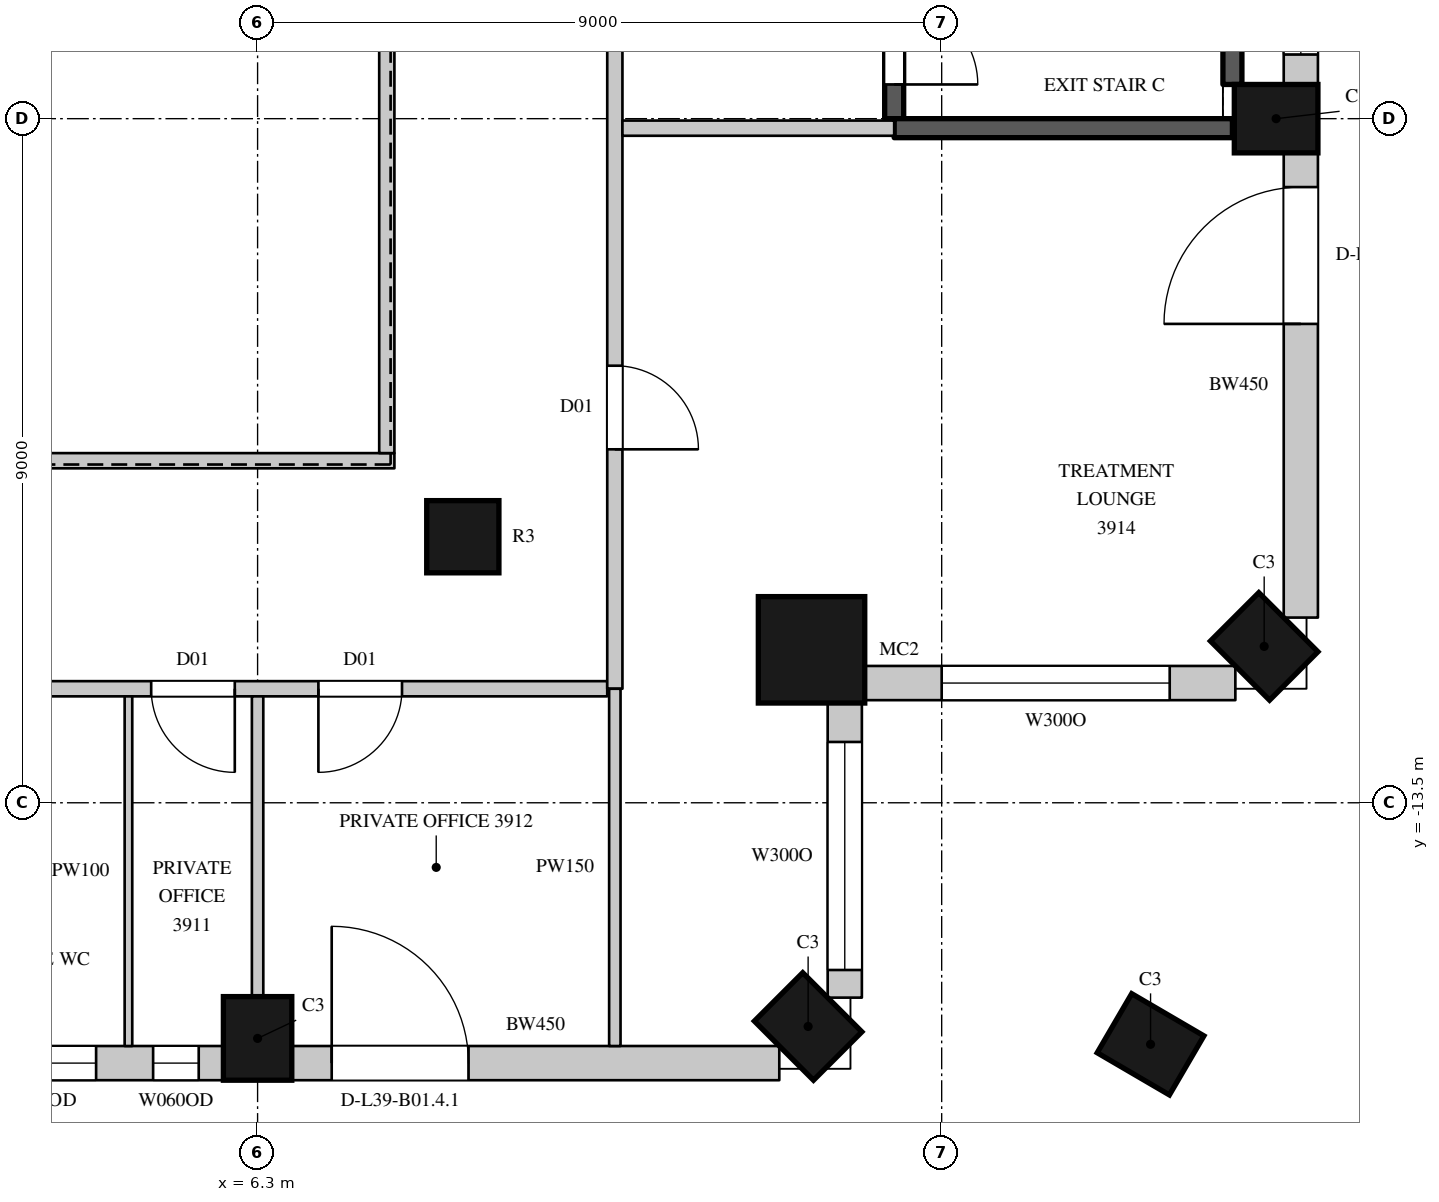
"""IFC4 building model, lengths in metres.
Left out: names, types, materials, properties, quantities, classifications, styles, units other than length and angle.
Written with IfcOpenShell. Run it as: python <this file> out.ifc"""

import sys

from ifc_helpers import new_model, si_unit, direction, frame, frame_2d, origin, origin_2d, place, context, subcontext, project, spatial, rectangle, circle, extrude, element, fill, save


model = new_model("IFC4")
c1 = context("Model", 3, precision=1e-05, world=origin(), true_north=direction((0.0, 1.0)))
c2 = subcontext(c1, "Body", "Model", "MODEL_VIEW")
j1 = project(units=[si_unit("LENGTHUNIT", "METRE"), si_unit("PLANEANGLEUNIT", "RADIAN")], contexts=[c1])
p1 = place(None, origin())
s1 = spatial("IfcSite", under=j1, at=p1, CompositionType="ELEMENT")
p2 = place(p1, origin())
s2 = spatial("IfcBuilding", under=s1, at=p2, CompositionType="ELEMENT")
p3 = place(p2, frame((0.0, 0.0, 181.0)))
s3 = spatial("IfcBuildingStorey", under=s2, at=p3, CompositionType="ELEMENT", Elevation=181.0)
for number, where, z_axis, x_axis in (
    (1, (6.3, -16.6, 0.0), (0.0, 0.0, 1.0), (1.0, 0.0, 0.0)),
    (2, (13.543, -16.443, 0.0), (0.0, 0.0, 1.0), (0.707, 0.707, 0.0)),
):
    element("IfcColumn", number, at=place(p3, frame(where, z_axis=z_axis, x_axis=x_axis)), inside=s3, PredefinedType="COLUMN", context=c2, shape_type="SweptSolid", body=[
        extrude(rectangle(XDim=0.9, YDim=1.1, at=origin_2d()), origin(), (0.0, 0.0, 1.0), 4.1),
    ])
p4 = place(p3, frame((13.588, -11.488, 0.0), z_axis=(0.0, 0.0, 1.0), x_axis=(1.0, 0.0, 0.0)))
e3 = element("IfcColumn", 3, at=p4, inside=s3, PredefinedType="COLUMN", context=c2, shape_type="SweptSolid", body=[
    extrude(circle(Radius=0.7, at=origin_2d()), origin(), (0.0, 0.0, 1.0), 4.1),
])
for number, where, z_axis, x_axis in (
    (4, (19.543, -11.443, 0.0), (0.0, 0.0, 1.0), (0.707, 0.707, 0.0)),
    (5, (19.7, -4.5, 0.0), (0.0, 0.0, 1.0), (0.0, 1.0, 0.0)),
    (6, (18.048, -16.677, 0.0), (0.0, 0.0, 1.0), (0.504, 0.863, 0.0)),
):
    element("IfcColumn", number, at=place(p3, frame(where, z_axis=z_axis, x_axis=x_axis)), inside=s3, PredefinedType="COLUMN", context=c2, shape_type="SweptSolid", body=[
        extrude(rectangle(XDim=0.9, YDim=1.1, at=origin_2d()), origin(), (0.0, 0.0, 1.0), 4.1),
    ])
p5 = place(p3, frame((9.0, -10.0, 0.0), z_axis=(0.0, 0.0, 1.0), x_axis=(1.0, 0.0, 0.0)))
e7 = element("IfcColumn", 7, at=p5, inside=s3, PredefinedType="COLUMN", context=c2, shape_type="SweptSolid", body=[
    extrude(circle(Radius=0.475, at=origin_2d()), origin(), (0.0, 0.0, 1.0), 4.1),
])
p6 = place(p3, frame((-2.25, -16.925, 0.0), z_axis=(0.0, 0.0, 1.0), x_axis=(1.0, 0.0, 0.0)))
e8 = element("IfcWall", 8, at=p6, inside=s3, PredefinedType="SOLIDWALL", context=c2, shape_type="SweptSolid", body=[
    extrude(rectangle(XDim=8.1, YDim=0.45, at=frame_2d((4.05, 0.0))), origin(), (0.0, 0.0, 1.0), 3.8),
])
p7 = place(p6, frame((0.2, 0.0, 0.0)))
e9 = element("IfcOpeningElement", 9, at=p7, cuts=e8, PredefinedType="OPENING", context=c2, shape_type="SweptSolid", body=[
    extrude(rectangle(XDim=1.8, YDim=2.4, at=frame_2d((0.9, 1.2))), frame((0.0, 0.235, 0.0), z_axis=(0.0, -1.0, 0.0), x_axis=(1.0, 0.0, 0.0)), (0.0, 0.0, 1.0), 0.47),
])
p8 = place(p6, frame((2.2, 0.0, 1.05)))
e10 = element("IfcOpeningElement", 10, at=p8, cuts=e8, PredefinedType="OPENING", context=c2, shape_type="SweptSolid", body=[
    extrude(rectangle(XDim=1.2, YDim=2.4, at=frame_2d((0.6, 1.2))), frame((0.0, 0.235, 0.0), z_axis=(0.0, -1.0, 0.0), x_axis=(1.0, 0.0, 0.0)), (0.0, 0.0, 1.0), 0.47),
])
p9 = place(p6, frame((4.926, 0.0, 1.05)))
e11 = element("IfcOpeningElement", 11, at=p9, cuts=e8, PredefinedType="OPENING", context=c2, shape_type="SweptSolid", body=[
    extrude(rectangle(XDim=1.5, YDim=2.4, at=frame_2d((0.75, 1.2))), frame((0.0, 0.235, 0.0), z_axis=(0.0, -1.0, 0.0), x_axis=(1.0, 0.0, 0.0)), (0.0, 0.0, 1.0), 0.47),
])
p10 = place(p6, frame((7.176, 0.0, 1.05)))
e12 = element("IfcOpeningElement", 12, at=p10, cuts=e8, PredefinedType="OPENING", context=c2, shape_type="SweptSolid", body=[
    extrude(rectangle(XDim=0.6, YDim=2.4, at=frame_2d((0.3, 1.2))), frame((0.0, 0.235, 0.0), z_axis=(0.0, -1.0, 0.0), x_axis=(1.0, 0.0, 0.0)), (0.0, 0.0, 1.0), 0.47),
])
p11 = place(p3, frame((6.75, -16.925, 0.0), z_axis=(0.0, 0.0, 1.0), x_axis=(1.0, 0.0, 0.0)))
e13 = element("IfcWall", 13, at=p11, inside=s3, PredefinedType="SOLIDWALL", context=c2, shape_type="SweptSolid", body=[
    extrude(rectangle(XDim=6.414, YDim=0.45, at=frame_2d((3.207, 0.0))), origin(), (0.0, 0.0, 1.0), 3.8),
])
p12 = place(p11, frame((0.525, 0.0, 0.0)))
e14 = element("IfcOpeningElement", 14, at=p12, cuts=e13, PredefinedType="OPENING", context=c2, shape_type="SweptSolid", body=[
    extrude(rectangle(XDim=1.8, YDim=2.4, at=frame_2d((0.9, 1.2))), frame((0.0, 0.235, 0.0), z_axis=(0.0, -1.0, 0.0), x_axis=(1.0, 0.0, 0.0)), (0.0, 0.0, 1.0), 0.47),
])
p13 = place(p3, frame((14.025, -16.064, 0.0), z_axis=(0.0, 0.0, 1.0), x_axis=(0.0, 1.0, 0.0)))
e15 = element("IfcWall", 15, at=p13, inside=s3, PredefinedType="SOLIDWALL", context=c2, shape_type="SweptSolid", body=[
    extrude(rectangle(XDim=3.909, YDim=0.45, at=frame_2d((1.955, 0.0))), origin(), (0.0, 0.0, 1.0), 3.8),
])
p14 = place(p13, frame((0.364, 0.0, 1.05)))
e16 = element("IfcOpeningElement", 16, at=p14, cuts=e15, PredefinedType="OPENING", context=c2, shape_type="SweptSolid", body=[
    extrude(rectangle(XDim=3.0, YDim=2.4, at=frame_2d((1.5, 1.2))), frame((0.0, 0.235, 0.0), z_axis=(0.0, -1.0, 0.0), x_axis=(1.0, 0.0, 0.0)), (0.0, 0.0, 1.0), 0.47),
])
p15 = place(p3, frame((14.255, -11.925, 0.0), z_axis=(0.0, 0.0, 1.0), x_axis=(1.0, 0.0, 0.0)))
e17 = element("IfcWall", 17, at=p15, inside=s3, PredefinedType="SOLIDWALL", context=c2, shape_type="SweptSolid", body=[
    extrude(rectangle(XDim=4.909, YDim=0.45, at=frame_2d((2.455, 0.0))), origin(), (0.0, 0.0, 1.0), 3.8),
])
p16 = place(p15, frame((1.045, 0.0, 1.05)))
e18 = element("IfcOpeningElement", 18, at=p16, cuts=e17, PredefinedType="OPENING", context=c2, shape_type="SweptSolid", body=[
    extrude(rectangle(XDim=3.0, YDim=2.4, at=frame_2d((1.5, 1.2))), frame((0.0, 0.235, 0.0), z_axis=(0.0, -1.0, 0.0), x_axis=(1.0, 0.0, 0.0)), (0.0, 0.0, 1.0), 0.47),
])
p17 = place(p3, frame((20.025, -11.064, 0.0), z_axis=(0.0, 0.0, 1.0), x_axis=(0.0, 1.0, 0.0)))
e19 = element("IfcWall", 19, at=p17, inside=s3, PredefinedType="SOLIDWALL", context=c2, shape_type="SweptSolid", body=[
    extrude(rectangle(XDim=6.114, YDim=0.45, at=frame_2d((3.057, 0.0))), origin(), (0.0, 0.0, 1.0), 3.8),
])
p18 = place(p17, frame((3.864, 0.0, 0.0)))
e20 = element("IfcOpeningElement", 20, at=p18, cuts=e19, PredefinedType="OPENING", context=c2, shape_type="SweptSolid", body=[
    extrude(rectangle(XDim=1.8, YDim=2.4, at=frame_2d((0.9, 1.2))), frame((0.0, 0.235, 0.0), z_axis=(0.0, -1.0, 0.0), x_axis=(1.0, 0.0, 0.0)), (0.0, 0.0, 1.0), 0.47),
])
p19 = place(p3, frame((20.025, -4.05, 0.0), z_axis=(0.0, 0.0, 1.0), x_axis=(0.0, 1.0, 0.0)))
e21 = element("IfcWall", 21, at=p19, inside=s3, PredefinedType="SOLIDWALL", context=c2, shape_type="SweptSolid", body=[
    extrude(rectangle(XDim=8.439, YDim=0.45, at=frame_2d((4.219, 0.0))), origin(), (0.0, 0.0, 1.0), 3.8),
])
p20 = place(p19, frame((0.394, 0.0, 1.05)))
e22 = element("IfcOpeningElement", 22, at=p20, cuts=e21, PredefinedType="OPENING", context=c2, shape_type="SweptSolid", body=[
    extrude(rectangle(XDim=3.0, YDim=2.4, at=frame_2d((1.5, 1.2))), frame((0.0, 0.235, 0.0), z_axis=(0.0, -1.0, 0.0), x_axis=(1.0, 0.0, 0.0)), (0.0, 0.0, 1.0), 0.47),
])
p21 = place(p19, frame((5.082, 0.0, 1.05)))
e23 = element("IfcOpeningElement", 23, at=p21, cuts=e21, PredefinedType="OPENING", context=c2, shape_type="SweptSolid", body=[
    extrude(rectangle(XDim=3.0, YDim=2.4, at=frame_2d((1.5, 1.2))), frame((0.0, 0.235, 0.0), z_axis=(0.0, -1.0, 0.0), x_axis=(1.0, 0.0, 0.0)), (0.0, 0.0, 1.0), 0.47),
])
p22 = place(p3, frame((-10.9, -12.0, 0.0), z_axis=(0.0, 0.0, 1.0), x_axis=(1.0, 0.0, 0.0)))
e24 = element("IfcWall", 24, at=p22, inside=s3, PredefinedType="PARTITIONING", context=c2, shape_type="SweptSolid", body=[
    extrude(rectangle(XDim=21.8, YDim=0.2, at=frame_2d((10.9, 0.0))), origin(), (0.0, 0.0, 1.0), 3.8),
])
p23 = place(p22, frame((0.95, 0.0, 0.0)))
e25 = element("IfcOpeningElement", 25, at=p23, cuts=e24, PredefinedType="OPENING", context=c2, shape_type="SweptSolid", body=[
    extrude(rectangle(XDim=0.9, YDim=2.2, at=frame_2d((0.45, 1.1))), frame((0.0, 0.11, 0.0), z_axis=(0.0, -1.0, 0.0), x_axis=(1.0, 0.0, 0.0)), (0.0, 0.0, 1.0), 0.22),
])
p24 = place(p22, frame((3.95, 0.0, 0.0)))
e26 = element("IfcOpeningElement", 26, at=p24, cuts=e24, PredefinedType="OPENING", context=c2, shape_type="SweptSolid", body=[
    extrude(rectangle(XDim=0.9, YDim=2.2, at=frame_2d((0.45, 1.1))), frame((0.0, 0.11, 0.0), z_axis=(0.0, -1.0, 0.0), x_axis=(1.0, 0.0, 0.0)), (0.0, 0.0, 1.0), 0.22),
])
p25 = place(p22, frame((6.7, 0.0, 0.0)))
e27 = element("IfcOpeningElement", 27, at=p25, cuts=e24, PredefinedType="OPENING", context=c2, shape_type="SweptSolid", body=[
    extrude(rectangle(XDim=0.9, YDim=2.2, at=frame_2d((0.45, 1.1))), frame((0.0, 0.11, 0.0), z_axis=(0.0, -1.0, 0.0), x_axis=(1.0, 0.0, 0.0)), (0.0, 0.0, 1.0), 0.22),
])
p26 = place(p22, frame((10.0, 0.0, 0.0)))
e28 = element("IfcOpeningElement", 28, at=p26, cuts=e24, PredefinedType="OPENING", context=c2, shape_type="SweptSolid", body=[
    extrude(rectangle(XDim=0.9, YDim=2.2, at=frame_2d((0.45, 1.1))), frame((0.0, 0.11, 0.0), z_axis=(0.0, -1.0, 0.0), x_axis=(1.0, 0.0, 0.0)), (0.0, 0.0, 1.0), 0.22),
])
p27 = place(p22, frame((13.55, 0.0, 0.0)))
e29 = element("IfcOpeningElement", 29, at=p27, cuts=e24, PredefinedType="OPENING", context=c2, shape_type="SweptSolid", body=[
    extrude(rectangle(XDim=0.9, YDim=2.2, at=frame_2d((0.45, 1.1))), frame((0.0, 0.11, 0.0), z_axis=(0.0, -1.0, 0.0), x_axis=(1.0, 0.0, 0.0)), (0.0, 0.0, 1.0), 0.22),
])
p28 = place(p22, frame((15.8, 0.0, 0.0)))
e30 = element("IfcOpeningElement", 30, at=p28, cuts=e24, PredefinedType="OPENING", context=c2, shape_type="SweptSolid", body=[
    extrude(rectangle(XDim=1.1, YDim=2.4, at=frame_2d((0.55, 1.2))), frame((0.0, 0.11, 0.0), z_axis=(0.0, -1.0, 0.0), x_axis=(1.0, 0.0, 0.0)), (0.0, 0.0, 1.0), 0.22),
])
p29 = place(p22, frame((18.0, 0.0, 0.0)))
e31 = element("IfcOpeningElement", 31, at=p29, cuts=e24, PredefinedType="OPENING", context=c2, shape_type="SweptSolid", body=[
    extrude(rectangle(XDim=1.1, YDim=2.4, at=frame_2d((0.55, 1.2))), frame((0.0, 0.11, 0.0), z_axis=(0.0, -1.0, 0.0), x_axis=(1.0, 0.0, 0.0)), (0.0, 0.0, 1.0), 0.22),
])
p30 = place(p3, frame((-2.48, -9.0, 0.0), z_axis=(0.0, 0.0, 1.0), x_axis=(1.0, 0.0, 0.0)))
e32 = element("IfcWall", 32, at=p30, inside=s3, PredefinedType="PARTITIONING", context=c2, shape_type="SweptSolid", body=[
    extrude(rectangle(XDim=10.58, YDim=0.2, at=frame_2d((5.29, 0.0))), origin(), (0.0, 0.0, 1.0), 3.8),
])
p31 = place(p3, frame((8.0, -8.9, 0.0), z_axis=(0.0, 0.0, 1.0), x_axis=(0.0, 1.0, 0.0)))
e33 = element("IfcWall", 33, at=p31, inside=s3, PredefinedType="PARTITIONING", context=c2, shape_type="SweptSolid", body=[
    extrude(rectangle(XDim=17.8, YDim=0.2, at=frame_2d((8.9, 0.0))), origin(), (0.0, 0.0, 1.0), 3.8),
])
p32 = place(p3, frame((11.0, -12.0, 0.0), z_axis=(0.0, 0.0, 1.0), x_axis=(0.0, 1.0, 0.0)))
e34 = element("IfcWall", 34, at=p32, inside=s3, PredefinedType="PARTITIONING", context=c2, shape_type="SweptSolid", body=[
    extrude(rectangle(XDim=24.1, YDim=0.2, at=frame_2d((12.05, 0.0))), origin(), (0.0, 0.0, 1.0), 3.8),
])
p33 = place(p32, frame((9.85, 0.0, 0.0)))
e35 = element("IfcOpeningElement", 35, at=p33, cuts=e34, PredefinedType="OPENING", context=c2, shape_type="SweptSolid", body=[
    extrude(rectangle(XDim=1.5, YDim=2.4, at=frame_2d((0.75, 1.2))), frame((0.0, 0.11, 0.0), z_axis=(0.0, -1.0, 0.0), x_axis=(1.0, 0.0, 0.0)), (0.0, 0.0, 1.0), 0.22),
])
p34 = place(p32, frame((3.15, 0.0, 0.0)))
e36 = element("IfcOpeningElement", 36, at=p34, cuts=e34, PredefinedType="OPENING", context=c2, shape_type="SweptSolid", body=[
    extrude(rectangle(XDim=1.1, YDim=2.4, at=frame_2d((0.55, 1.2))), frame((0.0, 0.11, 0.0), z_axis=(0.0, -1.0, 0.0), x_axis=(1.0, 0.0, 0.0)), (0.0, 0.0, 1.0), 0.22),
])
p35 = place(p3, frame((11.1, -4.625, 0.0), z_axis=(0.0, 0.0, 1.0), x_axis=(1.0, 0.0, 0.0)))
e37 = element("IfcWall", 37, at=p35, inside=s3, PredefinedType="PARTITIONING", context=c2, shape_type="SweptSolid", body=[
    extrude(rectangle(XDim=3.575, YDim=0.2, at=frame_2d((1.788, 0.0))), origin(), (0.0, 0.0, 1.0), 3.8),
])
p36 = place(p3, frame((6.3, -16.05, 0.0), z_axis=(0.0, 0.0, 1.0), x_axis=(0.0, 1.0, 0.0)))
e38 = element("IfcWall", 38, at=p36, inside=s3, PredefinedType="PARTITIONING", context=c2, shape_type="SweptSolid", body=[
    extrude(rectangle(XDim=3.95, YDim=0.15, at=frame_2d((1.975, 0.0))), origin(), (0.0, 0.0, 1.0), 3.25),
])
p37 = place(p3, frame((11.0, -16.7, 0.0), z_axis=(0.0, 0.0, 1.0), x_axis=(0.0, 1.0, 0.0)))
e39 = element("IfcWall", 39, at=p37, inside=s3, PredefinedType="PARTITIONING", context=c2, shape_type="SweptSolid", body=[
    extrude(rectangle(XDim=4.7, YDim=0.15, at=frame_2d((2.35, 0.0))), origin(), (0.0, 0.0, 1.0), 3.8),
])
p38 = place(p3, frame((14.675, -4.5, 0.0), z_axis=(0.0, 0.0, 1.0), x_axis=(0.0, 1.0, 0.0)))
e40 = element("IfcWall", 40, at=p38, inside=s3, PredefinedType="SHEAR", context=c2, shape_type="SweptSolid", body=[
    extrude(rectangle(XDim=9.0, YDim=0.25, at=frame_2d((4.5, 0.0))), origin(), (0.0, 0.0, 1.0), 3.8),
])
p39 = place(p38, frame((0.45, 0.0, 0.0)))
e41 = element("IfcOpeningElement", 41, at=p39, cuts=e40, PredefinedType="OPENING", context=c2, shape_type="SweptSolid", body=[
    extrude(rectangle(XDim=1.1, YDim=2.2, at=frame_2d((0.55, 1.1))), frame((0.0, 0.135, 0.0), z_axis=(0.0, -1.0, 0.0), x_axis=(1.0, 0.0, 0.0)), (0.0, 0.0, 1.0), 0.27),
])
p40 = place(p3, frame((14.675, -4.625, 0.0), z_axis=(0.0, 0.0, 1.0), x_axis=(1.0, 0.0, 0.0)))
e42 = element("IfcWall", 42, at=p40, inside=s3, PredefinedType="SHEAR", context=c2, shape_type="SweptSolid", body=[
    extrude(rectangle(XDim=4.45, YDim=0.25, at=frame_2d((2.225, 0.0))), origin(), (0.0, 0.0, 1.0), 3.8),
])
p41 = place(p3, frame((19.125, -4.05, 0.0), z_axis=(0.0, 0.0, 1.0), x_axis=(0.0, 1.0, 0.0)))
e43 = element("IfcWall", 43, at=p41, inside=s3, PredefinedType="SHEAR", context=c2, shape_type="SweptSolid", body=[
    extrude(rectangle(XDim=8.477, YDim=0.25, at=frame_2d((4.238, 0.0))), origin(), (0.0, 0.0, 1.0), 3.8),
])
p42 = place(p3, frame((4.601, -16.7, 0.0), z_axis=(0.0, 0.0, 1.0), x_axis=(0.0, 1.0, 0.0)))
e44 = element("IfcWall", 44, at=p42, inside=s3, PredefinedType="PARTITIONING", context=c2, shape_type="SweptSolid", body=[
    extrude(rectangle(XDim=4.6, YDim=0.1, at=frame_2d((2.3, 0.0))), origin(), (0.0, 0.0, 1.0), 3.8),
])
p43 = place(p12, origin())
e45 = element("IfcDoor", 45, at=p43, inside=s3, OperationType="SLIDING_TO_LEFT", PredefinedType="DOOR", context=c2, shape_type="SweptSolid", body=[
    extrude(rectangle(XDim=1.8, YDim=2.4, at=frame_2d((0.9, 1.2))), frame((0.0, 0.13, 0.0), z_axis=(0.0, -1.0, 0.0), x_axis=(1.0, 0.0, 0.0)), (0.0, 0.0, 1.0), 0.05),
])
fill(e14, e45)
p44 = place(p14, origin())
e46 = element("IfcWindow", 46, at=p44, inside=s3, PartitioningType="SINGLE_PANEL", PredefinedType="WINDOW", context=c2, shape_type="SweptSolid", body=[
    extrude(rectangle(XDim=3.0, YDim=2.4, at=frame_2d((1.5, 1.2))), frame((0.0, 0.135, 0.0), z_axis=(0.0, -1.0, 0.0), x_axis=(1.0, 0.0, 0.0)), (0.0, 0.0, 1.0), 0.06),
])
fill(e16, e46)
p45 = place(p16, origin())
e47 = element("IfcWindow", 47, at=p45, inside=s3, PartitioningType="SINGLE_PANEL", PredefinedType="WINDOW", context=c2, shape_type="SweptSolid", body=[
    extrude(rectangle(XDim=3.0, YDim=2.4, at=frame_2d((1.5, 1.2))), frame((0.0, 0.135, 0.0), z_axis=(0.0, -1.0, 0.0), x_axis=(1.0, 0.0, 0.0)), (0.0, 0.0, 1.0), 0.06),
])
fill(e18, e47)
p46 = place(p18, origin())
e48 = element("IfcDoor", 48, at=p46, inside=s3, OperationType="SLIDING_TO_LEFT", PredefinedType="DOOR", context=c2, shape_type="SweptSolid", body=[
    extrude(rectangle(XDim=1.8, YDim=2.4, at=frame_2d((0.9, 1.2))), frame((0.0, 0.13, 0.0), z_axis=(0.0, -1.0, 0.0), x_axis=(1.0, 0.0, 0.0)), (0.0, 0.0, 1.0), 0.05),
])
fill(e20, e48)
p47 = place(p20, origin())
e49 = element("IfcWindow", 49, at=p47, inside=s3, PartitioningType="SINGLE_PANEL", PredefinedType="WINDOW", context=c2, shape_type="SweptSolid", body=[
    extrude(rectangle(XDim=3.0, YDim=2.4, at=frame_2d((1.5, 1.2))), frame((0.0, 0.135, 0.0), z_axis=(0.0, -1.0, 0.0), x_axis=(1.0, 0.0, 0.0)), (0.0, 0.0, 1.0), 0.06),
])
fill(e22, e49)
p48 = place(p28, origin())
e50 = element("IfcDoor", 50, at=p48, inside=s3, OperationType="SINGLE_SWING_LEFT", PredefinedType="DOOR", context=c2, shape_type="SweptSolid", body=[
    extrude(rectangle(XDim=1.1, YDim=2.4, at=frame_2d((0.55, 1.2))), frame((0.0, 0.025, 0.0), z_axis=(0.0, -1.0, 0.0), x_axis=(1.0, 0.0, 0.0)), (0.0, 0.0, 1.0), 0.05),
])
fill(e30, e50)
p49 = place(p29, origin())
e51 = element("IfcDoor", 51, at=p49, inside=s3, OperationType="SINGLE_SWING_RIGHT", PredefinedType="DOOR", context=c2, shape_type="SweptSolid", body=[
    extrude(rectangle(XDim=1.1, YDim=2.4, at=frame_2d((0.55, 1.2))), frame((0.0, 0.025, 0.0), z_axis=(0.0, -1.0, 0.0), x_axis=(1.0, 0.0, 0.0)), (0.0, 0.0, 1.0), 0.05),
])
fill(e31, e51)
p50 = place(p34, origin())
e52 = element("IfcDoor", 52, at=p50, inside=s3, OperationType="SINGLE_SWING_RIGHT", PredefinedType="DOOR", context=c2, shape_type="SweptSolid", body=[
    extrude(rectangle(XDim=1.1, YDim=2.4, at=frame_2d((0.55, 1.2))), frame((0.0, 0.025, 0.0), z_axis=(0.0, -1.0, 0.0), x_axis=(1.0, 0.0, 0.0)), (0.0, 0.0, 1.0), 0.05),
])
fill(e36, e52)
p51 = place(p39, origin())
e53 = element("IfcDoor", 53, at=p51, inside=s3, OperationType="SINGLE_SWING_RIGHT", PredefinedType="DOOR", context=c2, shape_type="SweptSolid", body=[
    extrude(rectangle(XDim=1.1, YDim=2.2, at=frame_2d((0.55, 1.1))), frame((0.0, 0.025, 0.0), z_axis=(0.0, -1.0, 0.0), x_axis=(1.0, 0.0, 0.0)), (0.0, 0.0, 1.0), 0.05),
])
fill(e41, e53)
p52 = place(p9, origin())
e54 = element("IfcWindow", 54, at=p52, inside=s3, PartitioningType="SINGLE_PANEL", PredefinedType="WINDOW", context=c2, shape_type="SweptSolid", body=[
    extrude(rectangle(XDim=1.5, YDim=2.4, at=frame_2d((0.75, 1.2))), frame((0.0, 0.135, 0.0), z_axis=(0.0, -1.0, 0.0), x_axis=(1.0, 0.0, 0.0)), (0.0, 0.0, 1.0), 0.06),
])
fill(e11, e54)
p53 = place(p10, origin())
e55 = element("IfcWindow", 55, at=p53, inside=s3, PartitioningType="SINGLE_PANEL", PredefinedType="WINDOW", context=c2, shape_type="SweptSolid", body=[
    extrude(rectangle(XDim=0.6, YDim=2.4, at=frame_2d((0.3, 1.2))), frame((0.0, 0.135, 0.0), z_axis=(0.0, -1.0, 0.0), x_axis=(1.0, 0.0, 0.0)), (0.0, 0.0, 1.0), 0.06),
])
fill(e12, e55)
save(model, sys.argv[1])
